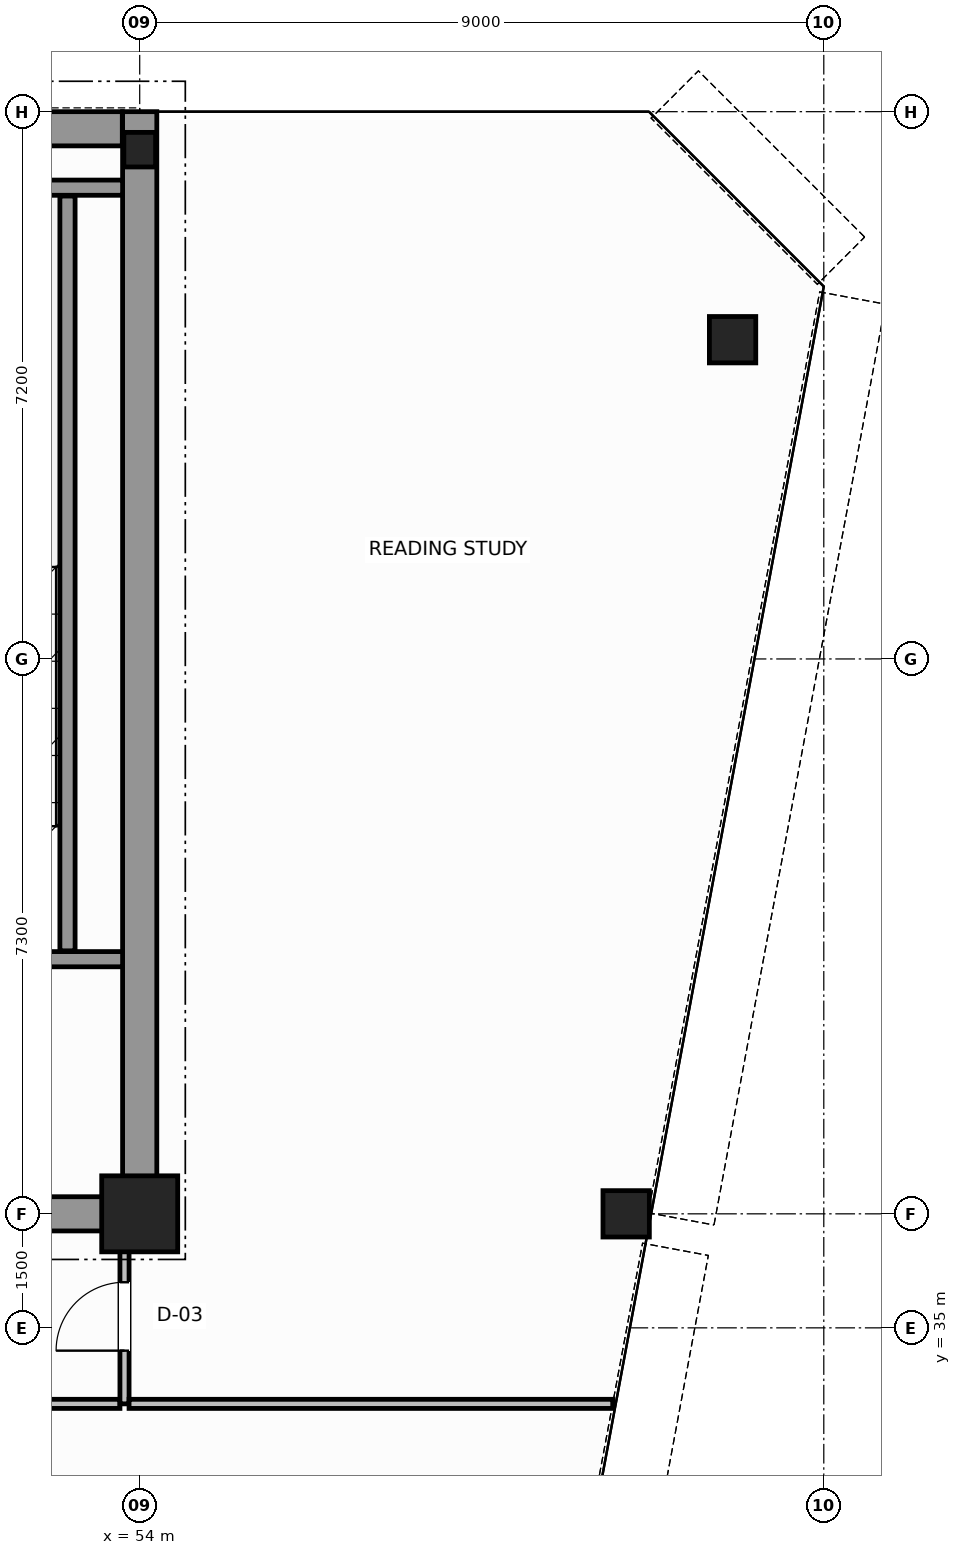
"""IFC4 building model, lengths in metres.
Left out: names, types, materials, properties, quantities, classifications, styles, units other than length and angle.
Written with IfcOpenShell. Run it as: python <this file> out.ifc"""

import sys

from ifc_helpers import new_model, si_unit, direction, frame, frame_2d, origin, origin_2d, place, context, subcontext, project, spatial, rectangle, hollow_circle, i_section, extrude, source, transform, mapped, element, fill, save


model = new_model("IFC4")
c1 = context("Model", 3, precision=1e-05, world=origin(), true_north=direction((0.0, 1.0)))
c2 = subcontext(c1, "Body", "Model", "MODEL_VIEW")
j1 = project(units=[si_unit("LENGTHUNIT", "METRE"), si_unit("PLANEANGLEUNIT", "RADIAN")], contexts=[c1])
p1 = place(None, origin())
s1 = spatial("IfcSite", under=j1, at=p1, CompositionType="ELEMENT")
p2 = place(p1, origin())
s2 = spatial("IfcBuilding", under=s1, at=p2, CompositionType="ELEMENT")
p3 = place(p2, frame((0.0, 0.0, 253.6)))
s3 = spatial("IfcBuildingStorey", under=s2, at=p3, CompositionType="ELEMENT", Elevation=253.6)
m1 = source(origin(), c2, "Body", "SweptSolid", [
    extrude(rectangle(XDim=1.0, YDim=1.0, at=origin_2d()), origin(), (0.0, 0.0, 1.0), 3.8),
])
p4 = place(p3, frame((54.0, 36.5, 0.0), z_axis=(0.0, 0.0, 1.0), x_axis=(1.0, 0.0, 0.0)))
e1 = element("IfcColumn", 1, at=p4, inside=s3, PredefinedType="COLUMN", context=c2, shape_type="MappedRepresentation", body=[
    mapped(m1, transform((0.0, 0.0, 0.0), scale=1.0)),
])
m2 = source(origin(), c2, "Body", "SweptSolid", [
    extrude(i_section(OverallWidth=0.418, OverallDepth=0.455, WebThickness=0.042, FlangeThickness=0.058, FilletRadius=0.015, at=origin_2d()), origin(), (0.0, 0.0, 1.0), 3.8),
])
p5 = place(p3, frame((54.0, 50.5, 0.0), z_axis=(0.0, 0.0, 1.0), x_axis=(1.0, 0.0, 0.0)))
e2 = element("IfcColumn", 2, at=p5, inside=s3, PredefinedType="COLUMN", context=c2, shape_type="MappedRepresentation", body=[
    mapped(m2, transform((0.0, 0.0, 0.0), scale=1.0)),
])
m3 = source(origin(), c2, "Body", "SweptSolid", [
    extrude(hollow_circle(Radius=0.305, WallThickness=0.03, at=origin_2d()), origin(), (0.0, 0.0, 1.0), 3.8),
])
for number, where, z_axis, x_axis in (
    (3, (61.8, 48.0, 0.0), (0.0, 0.0, 1.0), (1.0, 0.0, 0.0)),
    (4, (60.4, 36.5, 0.0), (0.0, 0.0, 1.0), (1.0, 0.0, 0.0)),
):
    element("IfcColumn", number, at=place(p3, frame(where, z_axis=z_axis, x_axis=x_axis)), inside=s3, PredefinedType="COLUMN", context=c2, shape_type="MappedRepresentation", body=[
        mapped(m3, transform((0.0, 0.0, 0.0), scale=1.0)),
    ])
p6 = place(p3, frame((34.002, 50.775, 0.0), z_axis=(0.0, 0.0, 1.0), x_axis=(1.0, 0.0, 0.0)))
e5 = element("IfcWall", 5, at=p6, inside=s3, PredefinedType="SHEAR", context=c2, shape_type="SweptSolid", body=[
    extrude(rectangle(XDim=19.769, YDim=0.45, at=frame_2d((9.885, 0.0))), origin(), (0.0, 0.0, 1.0), 3.8),
])
p7 = place(p3, frame((54.0, 36.5, 0.0), z_axis=(0.0, 0.0, 1.0), x_axis=(0.0, 1.0, 0.0)))
e6 = element("IfcWall", 6, at=p7, inside=s3, PredefinedType="SHEAR", context=c2, shape_type="SweptSolid", body=[
    extrude(rectangle(XDim=14.5, YDim=0.45, at=frame_2d((7.25, 0.0))), origin(), (0.0, 0.0, 1.0), 3.8),
])
p8 = place(p3, frame((49.8, 36.5, 0.0), z_axis=(0.0, 0.0, 1.0), x_axis=(1.0, 0.0, 0.0)))
e7 = element("IfcWall", 7, at=p8, inside=s3, PredefinedType="SHEAR", context=c2, shape_type="SweptSolid", body=[
    extrude(rectangle(XDim=3.955, YDim=0.45, at=frame_2d((1.978, 0.0))), origin(), (0.0, 0.0, 1.0), 2.58),
])
p9 = place(p3, frame((49.4, 39.85, 0.0), z_axis=(0.0, 0.0, 1.0), x_axis=(1.0, 0.0, 0.0)))
e8 = element("IfcWall", 8, at=p9, inside=s3, PredefinedType="SOLIDWALL", context=c2, shape_type="SweptSolid", body=[
    extrude(rectangle(XDim=4.375, YDim=0.2, at=frame_2d((2.188, 0.0))), origin(), (0.0, 0.0, 1.0), 3.8),
])
p10 = place(p9, frame((1.325, 0.0, 0.0)))
e9 = element("IfcOpeningElement", 9, at=p10, cuts=e8, PredefinedType="OPENING", context=c2, shape_type="SweptSolid", body=[
    extrude(rectangle(XDim=1.1, YDim=2.15, at=frame_2d((0.55, 1.075))), frame((0.0, 0.11, 0.0), z_axis=(0.0, -1.0, 0.0), x_axis=(1.0, 0.0, 0.0)), (0.0, 0.0, 1.0), 0.22),
])
p11 = place(p3, frame((49.4, 50.0, 0.0), z_axis=(0.0, 0.0, 1.0), x_axis=(1.0, 0.0, 0.0)))
e10 = element("IfcWall", 10, at=p11, inside=s3, PredefinedType="SOLIDWALL", context=c2, shape_type="SweptSolid", body=[
    extrude(rectangle(XDim=4.375, YDim=0.2, at=frame_2d((2.188, 0.0))), origin(), (0.0, 0.0, 1.0), 3.8),
])
p12 = place(p3, frame((53.05, 39.96, 0.0), z_axis=(0.0, 0.0, 1.0), x_axis=(0.0, 1.0, 0.0)))
e11 = element("IfcWall", 11, at=p12, inside=s3, PredefinedType="SOLIDWALL", context=c2, shape_type="SweptSolid", body=[
    extrude(rectangle(XDim=9.93, YDim=0.2, at=frame_2d((4.965, 0.0))), origin(), (0.0, 0.0, 1.0), 3.8),
])
p13 = place(p3, frame((43.26, 34.0, 0.0), z_axis=(0.0, 0.0, 1.0), x_axis=(1.0, 0.0, 0.0)))
e12 = element("IfcWall", 12, at=p13, inside=s3, PredefinedType="PARTITIONING", context=c2, shape_type="SweptSolid", body=[
    extrude(rectangle(XDim=10.48, YDim=0.12, at=frame_2d((5.24, 0.0))), origin(), (0.0, 0.0, 1.0), 3.58),
])
p14 = place(p3, frame((53.8, 34.0, 0.0), z_axis=(0.0, 0.0, 1.0), x_axis=(0.0, 1.0, 0.0)))
e13 = element("IfcWall", 13, at=p14, inside=s3, PredefinedType="PARTITIONING", context=c2, shape_type="SweptSolid", body=[
    extrude(rectangle(XDim=2.44, YDim=0.12, at=frame_2d((1.22, 0.0))), origin(), (0.0, 0.0, 1.0), 3.58),
])
p15 = place(p14, frame((0.7, 0.0, 0.0)))
e14 = element("IfcOpeningElement", 14, at=p15, cuts=e13, PredefinedType="OPENING", context=c2, shape_type="SweptSolid", body=[
    extrude(rectangle(XDim=0.9, YDim=2.15, at=frame_2d((0.45, 1.075))), frame((0.0, 0.07, 0.0), z_axis=(0.0, -1.0, 0.0), x_axis=(1.0, 0.0, 0.0)), (0.0, 0.0, 1.0), 0.14),
])
p16 = place(p3, frame((53.86, 34.0, 0.0), z_axis=(0.0, 0.0, 1.0), x_axis=(1.0, 0.0, 0.0)))
e15 = element("IfcWall", 15, at=p16, inside=s3, PredefinedType="PARTITIONING", context=c2, shape_type="SweptSolid", body=[
    extrude(rectangle(XDim=6.363, YDim=0.12, at=frame_2d((3.181, 0.0))), origin(), (0.0, 0.0, 1.0), 3.58),
])
m4 = source(origin(), c2, "Body", "SweptSolid", [
    extrude(rectangle(XDim=0.9, YDim=2.15, at=frame_2d((0.45, 1.075))), frame((0.0, 0.025, 0.0), z_axis=(0.0, -1.0, 0.0), x_axis=(1.0, 0.0, 0.0)), (0.0, 0.0, 1.0), 0.05),
])
p17 = place(p15, origin())
e16 = element("IfcDoor", 16, at=p17, inside=s3, OperationType="SINGLE_SWING_RIGHT", PredefinedType="DOOR", context=c2, shape_type="MappedRepresentation", body=[
    mapped(m4, transform((0.0, 0.0, 0.0), scale=1.0)),
])
fill(e14, e16)
save(model, sys.argv[1])
